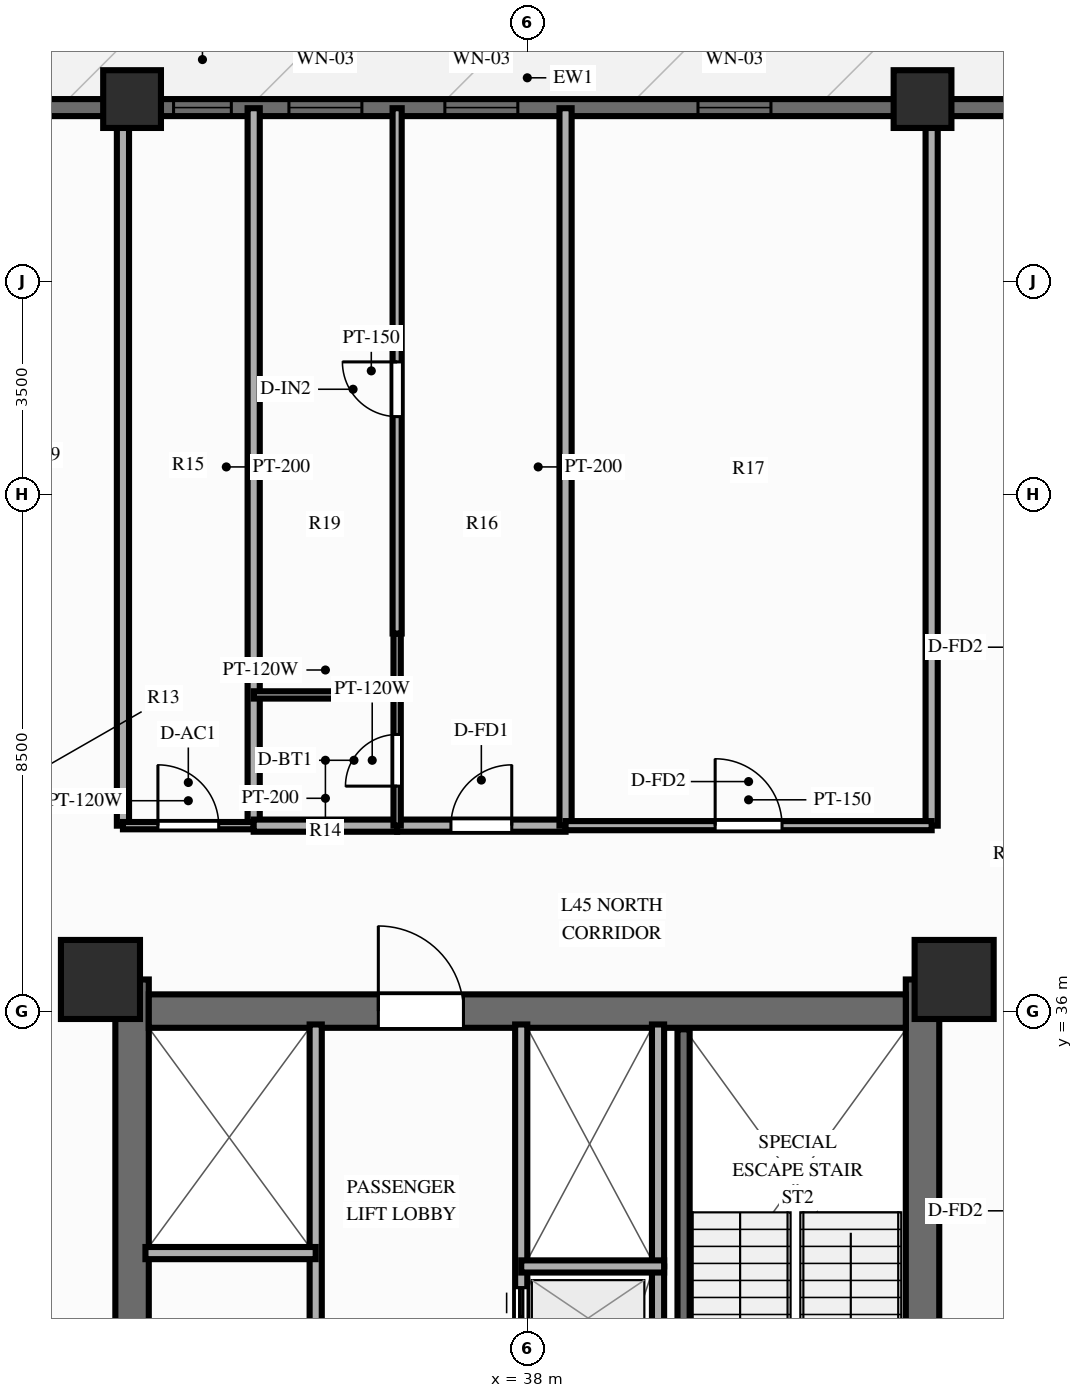
"""IFC4 building model, lengths in metres.
Left out: names, types, materials, properties, quantities, classifications, styles, units other than length and angle.
Written with IfcOpenShell. Run it as: python <this file> out.ifc"""

import sys

from ifc_helpers import new_model, si_unit, direction, frame, frame_2d, origin, origin_2d, place, context, subcontext, project, spatial, rectangle, extrude, source, transform, mapped, element, fill, save


model = new_model("IFC4")
c1 = context("Model", 3, precision=1e-05, world=origin(), true_north=direction((0.0, 1.0)))
c2 = subcontext(c1, "Body", "Model", "MODEL_VIEW")
j1 = project(units=[si_unit("LENGTHUNIT", "METRE"), si_unit("PLANEANGLEUNIT", "RADIAN")], contexts=[c1])
p1 = place(None, origin())
s1 = spatial("IfcSite", under=j1, at=p1, CompositionType="ELEMENT")
p2 = place(p1, origin())
s2 = spatial("IfcBuilding", under=s1, at=p2, CompositionType="ELEMENT")
p3 = place(p2, frame((0.0, 0.0, 141.75)))
s3 = spatial("IfcBuildingStorey", under=s2, at=p3, CompositionType="ELEMENT", Elevation=141.75)
p4 = place(p3, frame((31.5, 17.48, 0.0), z_axis=(0.0, 0.0, 1.0), x_axis=(0.0, 1.0, 0.0)))
e1 = element("IfcWall", 1, at=p4, inside=s3, PredefinedType="SHEAR", context=c2, shape_type="SweptSolid", body=[
    extrude(rectangle(XDim=19.04, YDim=0.55, at=frame_2d((9.52, 0.0))), origin(), (0.0, 0.0, 1.0), 3.0),
])
p5 = place(p4, frame((6.32, 0.0, 0.0)))
e2 = element("IfcOpeningElement", 2, at=p5, cuts=e1, PredefinedType="OPENING", context=c2, shape_type="SweptSolid", body=[
    extrude(rectangle(XDim=1.1, YDim=2.15, at=frame_2d((0.55, 1.075))), frame((0.0, 0.287, 0.0), z_axis=(0.0, -1.0, 0.0), x_axis=(1.0, 0.0, 0.0)), (0.0, 0.0, 1.0), 0.574),
])
p6 = place(p3, frame((44.5, 17.48, 0.0), z_axis=(0.0, 0.0, 1.0), x_axis=(0.0, 1.0, 0.0)))
e3 = element("IfcWall", 3, at=p6, inside=s3, PredefinedType="SHEAR", context=c2, shape_type="SweptSolid", body=[
    extrude(rectangle(XDim=19.04, YDim=0.55, at=frame_2d((9.52, 0.0))), origin(), (0.0, 0.0, 1.0), 3.0),
])
p7 = place(p6, frame((12.67, 0.0, 0.0), z_axis=(0.0, 0.0, 1.0), x_axis=(-1.0, 0.0, 0.0)))
e4 = element("IfcOpeningElement", 4, at=p7, cuts=e3, PredefinedType="OPENING", context=c2, shape_type="SweptSolid", body=[
    extrude(rectangle(XDim=1.1, YDim=2.15, at=frame_2d((0.55, 1.075))), frame((0.0, 0.287, 0.0), z_axis=(0.0, -1.0, 0.0), x_axis=(1.0, 0.0, 0.0)), (0.0, 0.0, 1.0), 0.574),
])
p8 = place(p3, frame((31.775, 36.0, 0.0), z_axis=(0.0, 0.0, 1.0), x_axis=(1.0, 0.0, 0.0)))
e5 = element("IfcWall", 5, at=p8, inside=s3, PredefinedType="SHEAR", context=c2, shape_type="SweptSolid", body=[
    extrude(rectangle(XDim=12.45, YDim=0.55, at=frame_2d((6.225, 0.0))), origin(), (0.0, 0.0, 1.0), 3.0),
])
p9 = place(p8, frame((5.175, 0.0, 0.0), z_axis=(0.0, 0.0, 1.0), x_axis=(-1.0, 0.0, 0.0)))
e6 = element("IfcOpeningElement", 6, at=p9, cuts=e5, PredefinedType="OPENING", context=c2, shape_type="SweptSolid", body=[
    extrude(rectangle(XDim=1.4, YDim=2.15, at=frame_2d((0.7, 1.075))), frame((0.0, 0.287, 0.0), z_axis=(0.0, -1.0, 0.0), x_axis=(1.0, 0.0, 0.0)), (0.0, 0.0, 1.0), 0.574),
])
m1 = source(origin(), c2, "Body", "SweptSolid", [
    extrude(rectangle(XDim=1.3, YDim=1.3, at=origin_2d()), origin(), (0.0, 0.0, 1.0), 3.0),
])
for number, where, z_axis, x_axis in (
    (7, (30.98, 36.52, 0.0), (0.0, 0.0, 1.0), (1.0, 0.0, 0.0)),
    (8, (45.02, 36.52, 0.0), (0.0, 0.0, 1.0), (1.0, 0.0, 0.0)),
):
    element("IfcColumn", number, at=place(p3, frame(where, z_axis=z_axis, x_axis=x_axis)), inside=s3, PredefinedType="COLUMN", context=c2, shape_type="MappedRepresentation", body=[
        mapped(m1, transform((0.0, 0.0, 0.0), scale=1.0)),
    ])
m2 = source(origin(), c2, "Body", "SweptSolid", [
    extrude(rectangle(XDim=0.95, YDim=0.95, at=origin_2d()), origin(), (0.0, 0.0, 1.0), 3.0),
])
for number, where, z_axis, x_axis in (
    (9, (44.5, 51.0, 0.0), (0.0, 0.0, 1.0), (1.0, 0.0, 0.0)),
    (10, (31.5, 51.0, 0.0), (0.0, 0.0, 1.0), (1.0, 0.0, 0.0)),
):
    element("IfcColumn", number, at=place(p3, frame(where, z_axis=z_axis, x_axis=x_axis)), inside=s3, PredefinedType="COLUMN", context=c2, shape_type="MappedRepresentation", body=[
        mapped(m2, transform((0.0, 0.0, 0.0), scale=1.0)),
    ])
p10 = place(p3, frame((16.2, 50.86, 0.0), z_axis=(0.0, 0.0, 1.0), x_axis=(1.0, 0.0, 0.0)))
e11 = element("IfcWall", 11, at=p10, inside=s3, PredefinedType="SOLIDWALL", context=c2, shape_type="SweptSolid", body=[
    extrude(rectangle(XDim=43.6, YDim=0.28, at=frame_2d((21.8, 0.0))), origin(), (0.0, 0.0, 1.0), 2.28),
])
p11 = place(p10, frame((7.1, 0.0, 0.0)))
e12 = element("IfcOpeningElement", 12, at=p11, cuts=e11, PredefinedType="OPENING", context=c2, shape_type="SweptSolid", body=[
    extrude(rectangle(XDim=1.1, YDim=2.15, at=frame_2d((0.55, 1.075))), frame((0.0, 0.152, 0.0), z_axis=(0.0, -1.0, 0.0), x_axis=(1.0, 0.0, 0.0)), (0.0, 0.0, 1.0), 0.304),
])
p12 = place(p10, frame((15.982, 0.0, 0.25)))
e13 = element("IfcOpeningElement", 13, at=p12, cuts=e11, PredefinedType="OPENING", context=c2, shape_type="SweptSolid", body=[
    extrude(rectangle(XDim=0.95, YDim=1.5, at=frame_2d((0.475, 0.75))), frame((0.0, 0.152, 0.0), z_axis=(0.0, -1.0, 0.0), x_axis=(1.0, 0.0, 0.0)), (0.0, 0.0, 1.0), 0.304),
])
p13 = place(p10, frame((17.88, 0.0, 0.25)))
e14 = element("IfcOpeningElement", 14, at=p13, cuts=e11, PredefinedType="OPENING", context=c2, shape_type="SweptSolid", body=[
    extrude(rectangle(XDim=1.2, YDim=1.5, at=frame_2d((0.6, 0.75))), frame((0.0, 0.152, 0.0), z_axis=(0.0, -1.0, 0.0), x_axis=(1.0, 0.0, 0.0)), (0.0, 0.0, 1.0), 0.304),
])
p14 = place(p10, frame((20.444, 0.0, 0.25)))
e15 = element("IfcOpeningElement", 15, at=p14, cuts=e11, PredefinedType="OPENING", context=c2, shape_type="SweptSolid", body=[
    extrude(rectangle(XDim=1.2, YDim=1.5, at=frame_2d((0.6, 0.75))), frame((0.0, 0.152, 0.0), z_axis=(0.0, -1.0, 0.0), x_axis=(1.0, 0.0, 0.0)), (0.0, 0.0, 1.0), 0.304),
])
p15 = place(p10, frame((24.607, 0.0, 0.25)))
e16 = element("IfcOpeningElement", 16, at=p15, cuts=e11, PredefinedType="OPENING", context=c2, shape_type="SweptSolid", body=[
    extrude(rectangle(XDim=1.2, YDim=1.5, at=frame_2d((0.6, 0.75))), frame((0.0, 0.152, 0.0), z_axis=(0.0, -1.0, 0.0), x_axis=(1.0, 0.0, 0.0)), (0.0, 0.0, 1.0), 0.304),
])
p16 = place(p10, frame((35.35, 0.0, 0.25)))
e17 = element("IfcOpeningElement", 17, at=p16, cuts=e11, PredefinedType="OPENING", context=c2, shape_type="SweptSolid", body=[
    extrude(rectangle(XDim=1.2, YDim=1.5, at=frame_2d((0.6, 0.75))), frame((0.0, 0.152, 0.0), z_axis=(0.0, -1.0, 0.0), x_axis=(1.0, 0.0, 0.0)), (0.0, 0.0, 1.0), 0.304),
])
p17 = place(p3, frame((40.15, 25.44, 0.0), z_axis=(0.0, 0.0, 1.0), x_axis=(0.0, 1.0, 0.0)))
e18 = element("IfcWall", 18, at=p17, inside=s3, PredefinedType="PARTITIONING", context=c2, shape_type="SweptSolid", body=[
    extrude(rectangle(XDim=6.36, YDim=0.2, at=frame_2d((3.18, 0.0))), origin(), (0.0, 0.0, 1.0), 2.7),
])
p18 = place(p3, frame((40.15, 31.8, 0.0), z_axis=(0.0, 0.0, 1.0), x_axis=(0.0, 1.0, 0.0)))
e19 = element("IfcWall", 19, at=p18, inside=s3, PredefinedType="PARTITIONING", context=c2, shape_type="SweptSolid", body=[
    extrude(rectangle(XDim=3.98, YDim=0.2, at=frame_2d((1.99, 0.0))), origin(), (0.0, 0.0, 1.0), 2.7),
])
p19 = place(p3, frame((40.57, 28.65, 0.0), z_axis=(0.0, 0.0, 1.0), x_axis=(0.0, 1.0, 0.0)))
e20 = element("IfcWall", 20, at=p19, inside=s3, PredefinedType="SOLIDWALL", context=c2, shape_type="SweptSolid", body=[
    extrude(rectangle(XDim=7.05, YDim=0.2, at=frame_2d((3.525, 0.0))), origin(), (0.0, 0.0, 1.0), 2.7),
])
p20 = place(p3, frame((34.52, 25.44, 0.0), z_axis=(0.0, 0.0, 1.0), x_axis=(0.0, 1.0, 0.0)))
e21 = element("IfcWall", 21, at=p20, inside=s3, PredefinedType="PARTITIONING", context=c2, shape_type="SweptSolid", body=[
    extrude(rectangle(XDim=10.34, YDim=0.2, at=frame_2d((5.17, 0.0))), origin(), (0.0, 0.0, 1.0), 2.7),
])
p21 = place(p20, frame((2.6, 0.0, 0.0)))
e22 = element("IfcOpeningElement", 22, at=p21, cuts=e21, PredefinedType="OPENING", context=c2, shape_type="SweptSolid", body=[
    extrude(rectangle(XDim=0.9, YDim=2.1, at=frame_2d((0.45, 1.05))), frame((0.0, 0.112, 0.0), z_axis=(0.0, -1.0, 0.0), x_axis=(1.0, 0.0, 0.0)), (0.0, 0.0, 1.0), 0.224),
])
p22 = place(p3, frame((31.72, 32.02, 0.0), z_axis=(0.0, 0.0, 1.0), x_axis=(1.0, 0.0, 0.0)))
e23 = element("IfcWall", 23, at=p22, inside=s3, PredefinedType="PARTITIONING", context=c2, shape_type="SweptSolid", body=[
    extrude(rectangle(XDim=2.8, YDim=0.2, at=frame_2d((1.4, 0.0))), origin(), (0.0, 0.0, 1.0), 2.7),
])
p23 = place(p3, frame((37.9, 25.44, 0.0), z_axis=(0.0, 0.0, 1.0), x_axis=(0.0, 1.0, 0.0)))
e24 = element("IfcWall", 24, at=p23, inside=s3, PredefinedType="PARTITIONING", context=c2, shape_type="SweptSolid", body=[
    extrude(rectangle(XDim=10.34, YDim=0.2, at=frame_2d((5.17, 0.0))), origin(), (0.0, 0.0, 1.0), 2.7),
])
p24 = place(p23, frame((0.32, 0.0, 0.0)))
e25 = element("IfcOpeningElement", 25, at=p24, cuts=e24, PredefinedType="OPENING", context=c2, shape_type="SweptSolid", body=[
    extrude(rectangle(XDim=1.0, YDim=2.15, at=frame_2d((0.5, 1.075))), frame((0.0, 0.112, 0.0), z_axis=(0.0, -1.0, 0.0), x_axis=(1.0, 0.0, 0.0)), (0.0, 0.0, 1.0), 0.224),
])
p25 = place(p23, frame((1.71, 0.0, 0.0)))
e26 = element("IfcOpeningElement", 26, at=p25, cuts=e24, PredefinedType="OPENING", context=c2, shape_type="SweptSolid", body=[
    extrude(rectangle(XDim=1.0, YDim=2.15, at=frame_2d((0.5, 1.075))), frame((0.0, 0.112, 0.0), z_axis=(0.0, -1.0, 0.0), x_axis=(1.0, 0.0, 0.0)), (0.0, 0.0, 1.0), 0.224),
])
p26 = place(p23, frame((3.51, 0.0, 0.0)))
e27 = element("IfcOpeningElement", 27, at=p26, cuts=e24, PredefinedType="OPENING", context=c2, shape_type="SweptSolid", body=[
    extrude(rectangle(XDim=1.0, YDim=2.15, at=frame_2d((0.5, 1.075))), frame((0.0, 0.112, 0.0), z_axis=(0.0, -1.0, 0.0), x_axis=(1.0, 0.0, 0.0)), (0.0, 0.0, 1.0), 0.224),
])
p27 = place(p23, frame((5.01, 0.0, 0.0)))
e28 = element("IfcOpeningElement", 28, at=p27, cuts=e24, PredefinedType="OPENING", context=c2, shape_type="SweptSolid", body=[
    extrude(rectangle(XDim=1.0, YDim=2.15, at=frame_2d((0.5, 1.075))), frame((0.0, 0.112, 0.0), z_axis=(0.0, -1.0, 0.0), x_axis=(1.0, 0.0, 0.0)), (0.0, 0.0, 1.0), 0.224),
])
p28 = place(p3, frame((37.9, 31.8, 0.0), z_axis=(0.0, 0.0, 1.0), x_axis=(1.0, 0.0, 0.0)))
e29 = element("IfcWall", 29, at=p28, inside=s3, PredefinedType="PARTITIONING", context=c2, shape_type="SweptSolid", body=[
    extrude(rectangle(XDim=2.35, YDim=0.2, at=frame_2d((1.175, 0.0))), origin(), (0.0, 0.0, 1.0), 2.7),
])
for number, where, z_axis, x_axis in (
    (30, (31.35, 39.05, 0.0), (0.0, 0.0, 1.0), (0.0, 1.0, 0.0)),
    (31, (44.65, 39.05, 0.0), (0.0, 0.0, 1.0), (0.0, 1.0, 0.0)),
):
    element("IfcWall", number, at=place(p3, frame(where, z_axis=z_axis, x_axis=x_axis)), inside=s3, PredefinedType="PARTITIONING", context=c2, shape_type="SweptSolid", body=[
        extrude(rectangle(XDim=11.8, YDim=0.2, at=frame_2d((5.9, 0.0))), origin(), (0.0, 0.0, 1.0), 2.34),
    ])
p29 = place(p3, frame((33.5, 39.05, 0.0), z_axis=(0.0, 0.0, 1.0), x_axis=(0.0, 1.0, 0.0)))
e32 = element("IfcWall", 32, at=p29, inside=s3, PredefinedType="PARTITIONING", context=c2, shape_type="SweptSolid", body=[
    extrude(rectangle(XDim=11.8, YDim=0.2, at=frame_2d((5.9, 0.0))), origin(), (0.0, 0.0, 1.0), 2.7),
])
p30 = place(p3, frame((31.35, 39.05, 0.0), z_axis=(0.0, 0.0, 1.0), x_axis=(1.0, 0.0, 0.0)))
e33 = element("IfcWall", 33, at=p30, inside=s3, PredefinedType="PARTITIONING", context=c2, shape_type="SweptSolid", body=[
    extrude(rectangle(XDim=2.15, YDim=0.12, at=frame_2d((1.075, 0.0))), origin(), (0.0, 0.0, 1.0), 2.7),
])
p31 = place(p30, frame((0.575, 0.0, 0.0)))
e34 = element("IfcOpeningElement", 34, at=p31, cuts=e33, PredefinedType="OPENING", context=c2, shape_type="SweptSolid", body=[
    extrude(rectangle(XDim=1.0, YDim=2.1, at=frame_2d((0.5, 1.05))), frame((0.0, 0.072, 0.0), z_axis=(0.0, -1.0, 0.0), x_axis=(1.0, 0.0, 0.0)), (0.0, 0.0, 1.0), 0.144),
])
p32 = place(p3, frame((33.5, 39.05, 0.0), z_axis=(0.0, 0.0, 1.0), x_axis=(1.0, 0.0, 0.0)))
e35 = element("IfcWall", 35, at=p32, inside=s3, PredefinedType="PARTITIONING", context=c2, shape_type="SweptSolid", body=[
    extrude(rectangle(XDim=2.359, YDim=0.2, at=frame_2d((1.18, 0.0))), origin(), (0.0, 0.0, 1.0), 2.7),
])
p33 = place(p3, frame((35.859, 39.05, 0.0), z_axis=(0.0, 0.0, 1.0), x_axis=(1.0, 0.0, 0.0)))
e36 = element("IfcWall", 36, at=p33, inside=s3, PredefinedType="PARTITIONING", context=c2, shape_type="SweptSolid", body=[
    extrude(rectangle(XDim=2.77, YDim=0.2, at=frame_2d((1.385, 0.0))), origin(), (0.0, 0.0, 1.0), 2.7),
])
p34 = place(p33, frame((0.885, 0.0, 0.0)))
e37 = element("IfcOpeningElement", 37, at=p34, cuts=e36, PredefinedType="OPENING", context=c2, shape_type="SweptSolid", body=[
    extrude(rectangle(XDim=1.0, YDim=2.15, at=frame_2d((0.5, 1.075))), frame((0.0, 0.112, 0.0), z_axis=(0.0, -1.0, 0.0), x_axis=(1.0, 0.0, 0.0)), (0.0, 0.0, 1.0), 0.224),
])
p35 = place(p3, frame((35.859, 39.05, 0.0), z_axis=(0.0, 0.0, 1.0), x_axis=(0.0, 1.0, 0.0)))
e38 = element("IfcWall", 38, at=p35, inside=s3, PredefinedType="PARTITIONING", context=c2, shape_type="SweptSolid", body=[
    extrude(rectangle(XDim=2.15, YDim=0.12, at=frame_2d((1.075, 0.0))), origin(), (0.0, 0.0, 1.0), 2.7),
])
p36 = place(p35, frame((0.65, 0.0, 0.0)))
e39 = element("IfcOpeningElement", 39, at=p36, cuts=e38, PredefinedType="OPENING", context=c2, shape_type="SweptSolid", body=[
    extrude(rectangle(XDim=0.85, YDim=2.05, at=frame_2d((0.425, 1.025))), frame((0.0, 0.072, 0.0), z_axis=(0.0, -1.0, 0.0), x_axis=(1.0, 0.0, 0.0)), (0.0, 0.0, 1.0), 0.144),
])
p37 = place(p3, frame((35.859, 41.2, 0.0), z_axis=(0.0, 0.0, 1.0), x_axis=(0.0, 1.0, 0.0)))
e40 = element("IfcWall", 40, at=p37, inside=s3, PredefinedType="PARTITIONING", context=c2, shape_type="SweptSolid", body=[
    extrude(rectangle(XDim=1.01, YDim=0.12, at=frame_2d((0.505, 0.0))), origin(), (0.0, 0.0, 1.0), 2.7),
])
p38 = place(p3, frame((33.5, 41.2, 0.0), z_axis=(0.0, 0.0, 1.0), x_axis=(1.0, 0.0, 0.0)))
e41 = element("IfcWall", 41, at=p38, inside=s3, PredefinedType="PARTITIONING", context=c2, shape_type="SweptSolid", body=[
    extrude(rectangle(XDim=2.359, YDim=0.12, at=frame_2d((1.18, 0.0))), origin(), (0.0, 0.0, 1.0), 2.7),
])
p39 = place(p3, frame((35.859, 42.21, 0.0), z_axis=(0.0, 0.0, 1.0), x_axis=(0.0, 1.0, 0.0)))
e42 = element("IfcWall", 42, at=p39, inside=s3, PredefinedType="PARTITIONING", context=c2, shape_type="SweptSolid", body=[
    extrude(rectangle(XDim=8.64, YDim=0.15, at=frame_2d((4.32, 0.0))), origin(), (0.0, 0.0, 1.0), 2.7),
])
p40 = place(p39, frame((3.567, 0.0, 0.0)))
e43 = element("IfcOpeningElement", 43, at=p40, cuts=e42, PredefinedType="OPENING", context=c2, shape_type="SweptSolid", body=[
    extrude(rectangle(XDim=0.9, YDim=2.1, at=frame_2d((0.45, 1.05))), frame((0.0, 0.087, 0.0), z_axis=(0.0, -1.0, 0.0), x_axis=(1.0, 0.0, 0.0)), (0.0, 0.0, 1.0), 0.174),
])
p41 = place(p3, frame((38.629, 39.05, 0.0), z_axis=(0.0, 0.0, 1.0), x_axis=(0.0, 1.0, 0.0)))
e44 = element("IfcWall", 44, at=p41, inside=s3, PredefinedType="PARTITIONING", context=c2, shape_type="SweptSolid", body=[
    extrude(rectangle(XDim=11.8, YDim=0.2, at=frame_2d((5.9, 0.0))), origin(), (0.0, 0.0, 1.0), 2.7),
])
p42 = place(p3, frame((38.629, 39.05, 0.0), z_axis=(0.0, 0.0, 1.0), x_axis=(1.0, 0.0, 0.0)))
e45 = element("IfcWall", 45, at=p42, inside=s3, PredefinedType="PARTITIONING", context=c2, shape_type="SweptSolid", body=[
    extrude(rectangle(XDim=6.021, YDim=0.15, at=frame_2d((3.01, 0.0))), origin(), (0.0, 0.0, 1.0), 2.7),
])
p43 = place(p42, frame((2.46, 0.0, 0.0)))
e46 = element("IfcOpeningElement", 46, at=p43, cuts=e45, PredefinedType="OPENING", context=c2, shape_type="SweptSolid", body=[
    extrude(rectangle(XDim=1.1, YDim=2.15, at=frame_2d((0.55, 1.075))), frame((0.0, 0.087, 0.0), z_axis=(0.0, -1.0, 0.0), x_axis=(1.0, 0.0, 0.0)), (0.0, 0.0, 1.0), 0.174),
])
m3 = source(origin(), c2, "Body", "SweptSolid", [
    extrude(rectangle(XDim=0.95, YDim=1.5, at=frame_2d((0.475, 0.75))), frame((0.0, 0.03, 0.0), z_axis=(0.0, -1.0, 0.0), x_axis=(1.0, 0.0, 0.0)), (0.0, 0.0, 1.0), 0.06),
])
p44 = place(p12, origin())
e47 = element("IfcWindow", 47, at=p44, inside=s3, PartitioningType="SINGLE_PANEL", PredefinedType="WINDOW", context=c2, shape_type="MappedRepresentation", body=[
    mapped(m3, transform((0.0, 0.0, 0.0), scale=1.0)),
])
fill(e13, e47)
m4 = source(origin(), c2, "Body", "SweptSolid", [
    extrude(rectangle(XDim=1.2, YDim=1.5, at=frame_2d((0.6, 0.75))), frame((0.0, 0.03, 0.0), z_axis=(0.0, -1.0, 0.0), x_axis=(1.0, 0.0, 0.0)), (0.0, 0.0, 1.0), 0.06),
])
p45 = place(p13, origin())
e48 = element("IfcWindow", 48, at=p45, inside=s3, PartitioningType="SINGLE_PANEL", PredefinedType="WINDOW", context=c2, shape_type="MappedRepresentation", body=[
    mapped(m4, transform((0.0, 0.0, 0.0), scale=1.0)),
])
fill(e14, e48)
p46 = place(p14, origin())
e49 = element("IfcWindow", 49, at=p46, inside=s3, PartitioningType="SINGLE_PANEL", PredefinedType="WINDOW", context=c2, shape_type="MappedRepresentation", body=[
    mapped(m4, transform((0.0, 0.0, 0.0), scale=1.0)),
])
fill(e15, e49)
p47 = place(p15, origin())
e50 = element("IfcWindow", 50, at=p47, inside=s3, PartitioningType="SINGLE_PANEL", PredefinedType="WINDOW", context=c2, shape_type="MappedRepresentation", body=[
    mapped(m4, transform((0.0, 0.0, 0.0), scale=1.0)),
])
fill(e16, e50)
m5 = source(origin(), c2, "Body", "SweptSolid", [
    extrude(rectangle(XDim=1.4, YDim=2.15, at=frame_2d((0.7, 1.075))), frame((0.0, 0.025, 0.0), z_axis=(0.0, -1.0, 0.0), x_axis=(1.0, 0.0, 0.0)), (0.0, 0.0, 1.0), 0.05),
])
p48 = place(p9, origin())
e51 = element("IfcDoor", 51, at=p48, inside=s3, OperationType="SINGLE_SWING_RIGHT", PredefinedType="DOOR", context=c2, shape_type="MappedRepresentation", body=[
    mapped(m5, transform((0.0, 0.0, 0.0), scale=1.0)),
])
fill(e6, e51)
m6 = source(origin(), c2, "Body", "SweptSolid", [
    extrude(rectangle(XDim=1.0, YDim=2.15, at=frame_2d((0.5, 1.075))), frame((0.0, 0.025, 0.0), z_axis=(0.0, -1.0, 0.0), x_axis=(1.0, 0.0, 0.0)), (0.0, 0.0, 1.0), 0.05),
])
p49 = place(p27, origin())
e52 = element("IfcDoor", 52, at=p49, inside=s3, OperationType="DOUBLE_DOOR_SLIDING", PredefinedType="DOOR", context=c2, shape_type="MappedRepresentation", body=[
    mapped(m6, transform((0.0, 0.0, 0.0), scale=1.0)),
])
fill(e28, e52)
m7 = source(origin(), c2, "Body", "SweptSolid", [
    extrude(rectangle(XDim=1.0, YDim=2.1, at=frame_2d((0.5, 1.05))), frame((0.0, 0.025, 0.0), z_axis=(0.0, -1.0, 0.0), x_axis=(1.0, 0.0, 0.0)), (0.0, 0.0, 1.0), 0.05),
])
p50 = place(p31, origin())
e53 = element("IfcDoor", 53, at=p50, inside=s3, OperationType="SINGLE_SWING_LEFT", PredefinedType="DOOR", context=c2, shape_type="MappedRepresentation", body=[
    mapped(m7, transform((0.0, 0.0, 0.0), scale=1.0)),
])
fill(e34, e53)
p51 = place(p34, origin())
e54 = element("IfcDoor", 54, at=p51, inside=s3, OperationType="SINGLE_SWING_RIGHT", PredefinedType="DOOR", context=c2, shape_type="MappedRepresentation", body=[
    mapped(m6, transform((0.0, 0.0, 0.0), scale=1.0)),
])
fill(e37, e54)
m8 = source(origin(), c2, "Body", "SweptSolid", [
    extrude(rectangle(XDim=0.85, YDim=2.05, at=frame_2d((0.425, 1.025))), frame((0.0, 0.025, 0.0), z_axis=(0.0, -1.0, 0.0), x_axis=(1.0, 0.0, 0.0)), (0.0, 0.0, 1.0), 0.05),
])
p52 = place(p36, origin())
e55 = element("IfcDoor", 55, at=p52, inside=s3, OperationType="SINGLE_SWING_LEFT", PredefinedType="DOOR", context=c2, shape_type="MappedRepresentation", body=[
    mapped(m8, transform((0.0, 0.0, 0.0), scale=1.0)),
])
fill(e39, e55)
m9 = source(origin(), c2, "Body", "SweptSolid", [
    extrude(rectangle(XDim=0.9, YDim=2.1, at=frame_2d((0.45, 1.05))), frame((0.0, 0.025, 0.0), z_axis=(0.0, -1.0, 0.0), x_axis=(1.0, 0.0, 0.0)), (0.0, 0.0, 1.0), 0.05),
])
p53 = place(p40, origin())
e56 = element("IfcDoor", 56, at=p53, inside=s3, OperationType="SINGLE_SWING_RIGHT", PredefinedType="DOOR", context=c2, shape_type="MappedRepresentation", body=[
    mapped(m9, transform((0.0, 0.0, 0.0), scale=1.0)),
])
fill(e43, e56)
m10 = source(origin(), c2, "Body", "SweptSolid", [
    extrude(rectangle(XDim=1.1, YDim=2.15, at=frame_2d((0.55, 1.075))), frame((0.0, 0.025, 0.0), z_axis=(0.0, -1.0, 0.0), x_axis=(1.0, 0.0, 0.0)), (0.0, 0.0, 1.0), 0.05),
])
p54 = place(p43, origin())
e57 = element("IfcDoor", 57, at=p54, inside=s3, OperationType="SINGLE_SWING_LEFT", PredefinedType="DOOR", context=c2, shape_type="MappedRepresentation", body=[
    mapped(m10, transform((0.0, 0.0, 0.0), scale=1.0)),
])
fill(e46, e57)
save(model, sys.argv[1])
